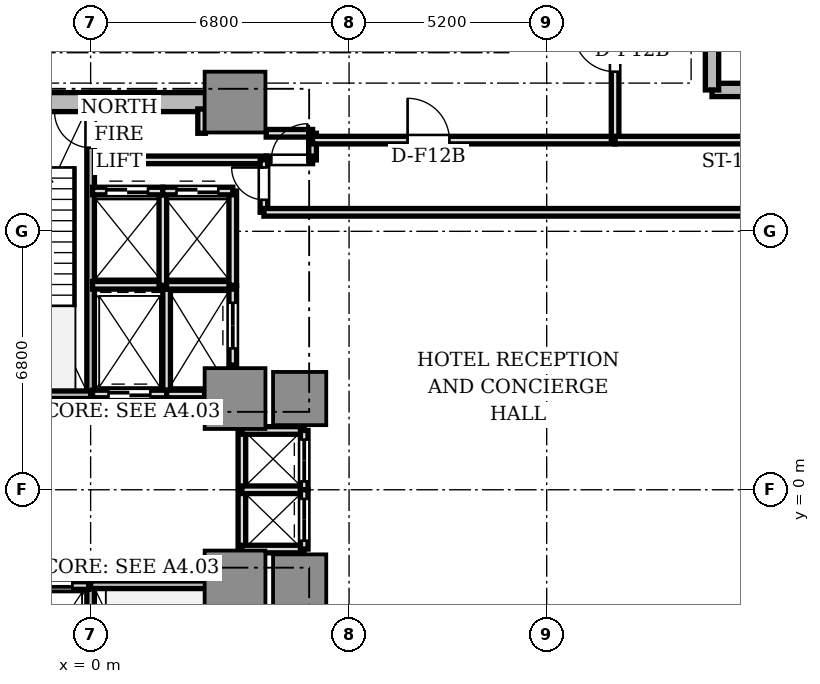
"""IFC4 building model, lengths in metres.
Left out: names, types, materials, properties, quantities, classifications, styles, units other than length and angle.
Written with IfcOpenShell. Run it as: python <this file> out.ifc"""

import sys

from ifc_helpers import new_model, si_unit, direction, frame, frame_2d, origin, origin_2d, place, context, subcontext, project, spatial, rectangle, extrude, source, transform, mapped, element, fill, save


model = new_model("IFC4")
c1 = context("Model", 3, precision=1e-05, world=origin(), true_north=direction((0.0, 1.0)))
c2 = subcontext(c1, "Body", "Model", "MODEL_VIEW")
j1 = project(units=[si_unit("LENGTHUNIT", "METRE"), si_unit("PLANEANGLEUNIT", "RADIAN")], contexts=[c1])
p1 = place(None, origin())
s1 = spatial("IfcSite", under=j1, at=p1, CompositionType="ELEMENT")
p2 = place(p1, origin())
s2 = spatial("IfcBuilding", under=s1, at=p2, CompositionType="ELEMENT")
p3 = place(p2, origin())
s3 = spatial("IfcBuildingStorey", under=s2, at=p3, CompositionType="ELEMENT", Elevation=0.0)
p4 = place(p3, frame((-3.55, 10.2, 0.0), z_axis=(0.0, 0.0, 1.0), x_axis=(1.0, 0.0, 0.0)))
e1 = element("IfcWall", 1, at=p4, inside=s3, PredefinedType="SHEAR", context=c2, shape_type="SweptSolid", body=[
    extrude(rectangle(XDim=7.1, YDim=0.5, at=frame_2d((3.55, 0.0))), origin(), (0.0, 0.0, 1.0), 4.48),
])
p5 = place(p3, frame((3.8, -9.75, 0.0), z_axis=(0.0, 0.0, 1.0), x_axis=(0.0, 1.0, 0.0)))
e2 = element("IfcWall", 2, at=p5, inside=s3, PredefinedType="SHEAR", context=c2, shape_type="SweptSolid", body=[
    extrude(rectangle(XDim=6.9, YDim=0.5, at=frame_2d((3.45, 0.0))), origin(), (0.0, 0.0, 1.0), 4.48),
])
m1 = source(origin(), c2, "Body", "SweptSolid", [
    extrude(rectangle(XDim=1.6, YDim=1.6, at=origin_2d()), origin(), (0.0, 0.0, 1.0), 4.48),
])
for number, where, z_axis, x_axis in (
    (3, (3.8, 2.4, 0.0), (0.0, 0.0, 1.0), (1.0, 0.0, 0.0)),
    (4, (3.8, 10.2, 0.0), (0.0, 0.0, 1.0), (1.0, 0.0, 0.0)),
    (5, (3.8, -2.4, 0.0), (0.0, 0.0, 1.0), (1.0, 0.0, 0.0)),
):
    element("IfcColumn", number, at=place(p3, frame(where, z_axis=z_axis, x_axis=x_axis)), inside=s3, PredefinedType="COLUMN", context=c2, shape_type="MappedRepresentation", body=[
        mapped(m1, transform((0.0, 0.0, 0.0), scale=1.0)),
    ])
m2 = source(origin(), c2, "Body", "SweptSolid", [
    extrude(rectangle(XDim=1.4, YDim=1.4, at=origin_2d()), origin(), (0.0, 0.0, 1.0), 4.48),
])
for number, where, z_axis, x_axis in (
    (6, (5.5, 2.4, 0.0), (0.0, 0.0, 1.0), (1.0, 0.0, 0.0)),
    (7, (5.5, -2.4, 0.0), (0.0, 0.0, 1.0), (1.0, 0.0, 0.0)),
):
    element("IfcColumn", number, at=place(p3, frame(where, z_axis=z_axis, x_axis=x_axis)), inside=s3, PredefinedType="COLUMN", context=c2, shape_type="MappedRepresentation", body=[
        mapped(m2, transform((0.0, 0.0, 0.0), scale=1.0)),
    ])
p6 = place(p3, frame((0.0, 2.5, 0.0), z_axis=(0.0, 0.0, 1.0), x_axis=(0.0, 1.0, 0.0)))
e8 = element("IfcWall", 8, at=p6, inside=s3, PredefinedType="SOLIDWALL", context=c2, shape_type="SweptSolid", body=[
    extrude(rectangle(XDim=7.68, YDim=0.2, at=frame_2d((3.84, 0.0))), origin(), (0.0, 0.0, 1.0), 4.48),
])
p7 = place(p6, frame((6.5, 0.0, 0.0)))
e9 = element("IfcOpeningElement", 9, at=p7, cuts=e8, PredefinedType="OPENING", context=c2, shape_type="SweptSolid", body=[
    extrude(rectangle(XDim=0.95, YDim=2.15, at=frame_2d((0.475, 1.075))), frame((0.0, 0.11, 0.0), z_axis=(0.0, -1.0, 0.0), x_axis=(1.0, 0.0, 0.0)), (0.0, 0.0, 1.0), 0.22),
])
p8 = place(p3, frame((-3.72, 2.5, 0.0), z_axis=(0.0, 0.0, 1.0), x_axis=(1.0, 0.0, 0.0)))
e10 = element("IfcWall", 10, at=p8, inside=s3, PredefinedType="SOLIDWALL", context=c2, shape_type="SweptSolid", body=[
    extrude(rectangle(XDim=3.72, YDim=0.2, at=frame_2d((1.86, 0.0))), origin(), (0.0, 0.0, 1.0), 4.48),
])
p9 = place(p3, frame((0.0, -10.18, 0.0), z_axis=(0.0, 0.0, 1.0), x_axis=(0.0, 1.0, 0.0)))
e11 = element("IfcWall", 11, at=p9, inside=s3, PredefinedType="SOLIDWALL", context=c2, shape_type="SweptSolid", body=[
    extrude(rectangle(XDim=7.68, YDim=0.2, at=frame_2d((3.84, 0.0))), origin(), (0.0, 0.0, 1.0), 4.48),
])
p10 = place(p9, frame((0.28, 0.0, 0.0)))
e12 = element("IfcOpeningElement", 12, at=p10, cuts=e11, PredefinedType="OPENING", context=c2, shape_type="SweptSolid", body=[
    extrude(rectangle(XDim=1.1, YDim=2.15, at=frame_2d((0.55, 1.075))), frame((0.0, 0.11, 0.0), z_axis=(0.0, -1.0, 0.0), x_axis=(1.0, 0.0, 0.0)), (0.0, 0.0, 1.0), 0.22),
])
p11 = place(p3, frame((0.0, -2.5, 0.0), z_axis=(0.0, 0.0, 1.0), x_axis=(1.0, 0.0, 0.0)))
e13 = element("IfcWall", 13, at=p11, inside=s3, PredefinedType="SOLIDWALL", context=c2, shape_type="SweptSolid", body=[
    extrude(rectangle(XDim=3.72, YDim=0.2, at=frame_2d((1.86, 0.0))), origin(), (0.0, 0.0, 1.0), 4.48),
])
p12 = place(p3, frame((2.0, 2.5, 0.0), z_axis=(0.0, 0.0, 1.0), x_axis=(0.0, 1.0, 0.0)))
e14 = element("IfcWall", 14, at=p12, inside=s3, PredefinedType="SOLIDWALL", context=c2, shape_type="SweptSolid", body=[
    extrude(rectangle(XDim=2.78, YDim=0.2, at=frame_2d((1.39, 0.0))), origin(), (0.0, 0.0, 1.0), 4.03),
])
p13 = place(p3, frame((0.05, 2.52, 0.0), z_axis=(0.0, 0.0, 1.0), x_axis=(1.0, 0.0, 0.0)))
e15 = element("IfcWall", 15, at=p13, inside=s3, PredefinedType="SOLIDWALL", context=c2, shape_type="SweptSolid", body=[
    extrude(rectangle(XDim=1.95, YDim=0.2, at=frame_2d((0.975, 0.0))), origin(), (0.0, 0.0, 1.0), 4.03),
])
p14 = place(p13, frame((0.42, 0.0, 0.0)))
e16 = element("IfcOpeningElement", 16, at=p14, cuts=e15, PredefinedType="OPENING", context=c2, shape_type="SweptSolid", body=[
    extrude(rectangle(XDim=1.1, YDim=2.2, at=frame_2d((0.55, 1.1))), frame((0.0, 0.11, 0.0), z_axis=(0.0, -1.0, 0.0), x_axis=(1.0, 0.0, 0.0)), (0.0, 0.0, 1.0), 0.22),
])
p15 = place(p3, frame((-2.0, -2.52, 0.0), z_axis=(0.0, 0.0, 1.0), x_axis=(1.0, 0.0, 0.0)))
e17 = element("IfcWall", 17, at=p15, inside=s3, PredefinedType="SOLIDWALL", context=c2, shape_type="SweptSolid", body=[
    extrude(rectangle(XDim=1.95, YDim=0.2, at=frame_2d((0.975, 0.0))), origin(), (0.0, 0.0, 1.0), 4.03),
])
p16 = place(p15, frame((0.42, 0.0, 0.0)))
e18 = element("IfcOpeningElement", 18, at=p16, cuts=e17, PredefinedType="OPENING", context=c2, shape_type="SweptSolid", body=[
    extrude(rectangle(XDim=1.1, YDim=2.2, at=frame_2d((0.55, 1.1))), frame((0.0, 0.11, 0.0), z_axis=(0.0, -1.0, 0.0), x_axis=(1.0, 0.0, 0.0)), (0.0, 0.0, 1.0), 0.22),
])
p17 = place(p3, frame((2.0, 2.52, 0.0), z_axis=(0.0, 0.0, 1.0), x_axis=(1.0, 0.0, 0.0)))
e19 = element("IfcWall", 19, at=p17, inside=s3, PredefinedType="SOLIDWALL", context=c2, shape_type="SweptSolid", body=[
    extrude(rectangle(XDim=1.0, YDim=0.2, at=frame_2d((0.5, 0.0))), origin(), (0.0, 0.0, 1.0), 4.03),
])
p18 = place(p3, frame((3.74, 3.28, 0.0), z_axis=(0.0, 0.0, 1.0), x_axis=(0.0, 1.0, 0.0)))
e20 = element("IfcWall", 20, at=p18, inside=s3, PredefinedType="SOLIDWALL", context=c2, shape_type="SweptSolid", body=[
    extrude(rectangle(XDim=2.08, YDim=0.2, at=frame_2d((1.04, 0.0))), origin(), (0.0, 0.0, 1.0), 4.03),
])
p19 = place(p18, frame((0.44, 0.0, 0.0)))
e21 = element("IfcOpeningElement", 21, at=p19, cuts=e20, PredefinedType="OPENING", context=c2, shape_type="SweptSolid", body=[
    extrude(rectangle(XDim=1.2, YDim=2.2, at=frame_2d((0.6, 1.1))), frame((0.0, 0.11, 0.0), z_axis=(0.0, -1.0, 0.0), x_axis=(1.0, 0.0, 0.0)), (0.0, 0.0, 1.0), 0.22),
])
p20 = place(p3, frame((0.05, 5.38, 0.0), z_axis=(0.0, 0.0, 1.0), x_axis=(1.0, 0.0, 0.0)))
e22 = element("IfcWall", 22, at=p20, inside=s3, PredefinedType="SOLIDWALL", context=c2, shape_type="SweptSolid", body=[
    extrude(rectangle(XDim=3.69, YDim=0.2, at=frame_2d((1.845, 0.0))), origin(), (0.0, 0.0, 1.0), 4.03),
])
p21 = place(p3, frame((1.9, 5.38, 0.0), z_axis=(0.0, 0.0, 1.0), x_axis=(0.0, 1.0, 0.0)))
e23 = element("IfcWall", 23, at=p21, inside=s3, PredefinedType="SOLIDWALL", context=c2, shape_type="SweptSolid", body=[
    extrude(rectangle(XDim=2.48, YDim=0.2, at=frame_2d((1.24, 0.0))), origin(), (0.0, 0.0, 1.0), 4.03),
])
p22 = place(p3, frame((0.05, 7.86, 0.0), z_axis=(0.0, 0.0, 1.0), x_axis=(1.0, 0.0, 0.0)))
e24 = element("IfcWall", 24, at=p22, inside=s3, PredefinedType="SOLIDWALL", context=c2, shape_type="SweptSolid", body=[
    extrude(rectangle(XDim=1.85, YDim=0.2, at=frame_2d((0.925, 0.0))), origin(), (0.0, 0.0, 1.0), 4.03),
])
p23 = place(p22, frame((0.36, 0.0, 0.0)))
e25 = element("IfcOpeningElement", 25, at=p23, cuts=e24, PredefinedType="OPENING", context=c2, shape_type="SweptSolid", body=[
    extrude(rectangle(XDim=1.1, YDim=2.2, at=frame_2d((0.55, 1.1))), frame((0.0, 0.11, 0.0), z_axis=(0.0, -1.0, 0.0), x_axis=(1.0, 0.0, 0.0)), (0.0, 0.0, 1.0), 0.22),
])
p24 = place(p3, frame((3.74, 5.38, 0.0), z_axis=(0.0, 0.0, 1.0), x_axis=(0.0, 1.0, 0.0)))
e26 = element("IfcWall", 26, at=p24, inside=s3, PredefinedType="SOLIDWALL", context=c2, shape_type="SweptSolid", body=[
    extrude(rectangle(XDim=2.48, YDim=0.2, at=frame_2d((1.24, 0.0))), origin(), (0.0, 0.0, 1.0), 4.03),
])
p25 = place(p3, frame((1.9, 7.86, 0.0), z_axis=(0.0, 0.0, 1.0), x_axis=(1.0, 0.0, 0.0)))
e27 = element("IfcWall", 27, at=p25, inside=s3, PredefinedType="SOLIDWALL", context=c2, shape_type="SweptSolid", body=[
    extrude(rectangle(XDim=1.84, YDim=0.2, at=frame_2d((0.92, 0.0))), origin(), (0.0, 0.0, 1.0), 4.03),
])
p26 = place(p25, frame((0.36, 0.0, 0.0)))
e28 = element("IfcOpeningElement", 28, at=p26, cuts=e27, PredefinedType="OPENING", context=c2, shape_type="SweptSolid", body=[
    extrude(rectangle(XDim=1.1, YDim=2.2, at=frame_2d((0.55, 1.1))), frame((0.0, 0.11, 0.0), z_axis=(0.0, -1.0, 0.0), x_axis=(1.0, 0.0, 0.0)), (0.0, 0.0, 1.0), 0.22),
])
p27 = place(p3, frame((3.98, -1.56, 0.0), z_axis=(0.0, 0.0, 1.0), x_axis=(0.0, 1.0, 0.0)))
e29 = element("IfcWall", 29, at=p27, inside=s3, PredefinedType="SOLIDWALL", context=c2, shape_type="SweptSolid", body=[
    extrude(rectangle(XDim=3.12, YDim=0.2, at=frame_2d((1.56, 0.0))), origin(), (0.0, 0.0, 1.0), 3.55),
])
for number, where, z_axis, x_axis in (
    (30, (3.98, 1.56, 0.0), (0.0, 0.0, 1.0), (1.0, 0.0, 0.0)),
    (31, (3.98, -1.56, 0.0), (0.0, 0.0, 1.0), (1.0, 0.0, 0.0)),
    (32, (3.98, 0.0, 0.0), (0.0, 0.0, 1.0), (1.0, 0.0, 0.0)),
):
    element("IfcWall", number, at=place(p3, frame(where, z_axis=z_axis, x_axis=x_axis)), inside=s3, PredefinedType="SOLIDWALL", context=c2, shape_type="SweptSolid", body=[
        extrude(rectangle(XDim=1.64, YDim=0.2, at=frame_2d((0.82, 0.0))), origin(), (0.0, 0.0, 1.0), 4.03),
    ])
p28 = place(p3, frame((5.62, 0.0, 0.0), z_axis=(0.0, 0.0, 1.0), x_axis=(0.0, 1.0, 0.0)))
e33 = element("IfcWall", 33, at=p28, inside=s3, PredefinedType="SOLIDWALL", context=c2, shape_type="SweptSolid", body=[
    extrude(rectangle(XDim=1.56, YDim=0.2, at=frame_2d((0.78, 0.0))), origin(), (0.0, 0.0, 1.0), 4.03),
])
p29 = place(p28, frame((0.22, 0.0, 0.0)))
e34 = element("IfcOpeningElement", 34, at=p29, cuts=e33, PredefinedType="OPENING", context=c2, shape_type="SweptSolid", body=[
    extrude(rectangle(XDim=1.1, YDim=2.2, at=frame_2d((0.55, 1.1))), frame((0.0, 0.11, 0.0), z_axis=(0.0, -1.0, 0.0), x_axis=(1.0, 0.0, 0.0)), (0.0, 0.0, 1.0), 0.22),
])
p30 = place(p3, frame((5.62, -1.56, 0.0), z_axis=(0.0, 0.0, 1.0), x_axis=(0.0, 1.0, 0.0)))
e35 = element("IfcWall", 35, at=p30, inside=s3, PredefinedType="SOLIDWALL", context=c2, shape_type="SweptSolid", body=[
    extrude(rectangle(XDim=1.56, YDim=0.2, at=frame_2d((0.78, 0.0))), origin(), (0.0, 0.0, 1.0), 4.03),
])
p31 = place(p30, frame((0.22, 0.0, 0.0)))
e36 = element("IfcOpeningElement", 36, at=p31, cuts=e35, PredefinedType="OPENING", context=c2, shape_type="SweptSolid", body=[
    extrude(rectangle(XDim=1.1, YDim=2.2, at=frame_2d((0.55, 1.1))), frame((0.0, 0.11, 0.0), z_axis=(0.0, -1.0, 0.0), x_axis=(1.0, 0.0, 0.0)), (0.0, 0.0, 1.0), 0.22),
])
p32 = place(p3, frame((16.35, 10.52, 0.0), z_axis=(0.0, 0.0, 1.0), x_axis=(1.0, 0.0, 0.0)))
e37 = element("IfcWall", 37, at=p32, inside=s3, PredefinedType="SHEAR", context=c2, shape_type="SweptSolid", body=[
    extrude(rectangle(XDim=10.25, YDim=0.35, at=frame_2d((5.125, 0.0))), origin(), (0.0, 0.0, 1.0), 4.48),
])
p33 = place(p3, frame((16.35, 10.52, 0.0), z_axis=(0.0, 0.0, 1.0), x_axis=(0.0, 1.0, 0.0)))
e38 = element("IfcWall", 38, at=p33, inside=s3, PredefinedType="SHEAR", context=c2, shape_type="SweptSolid", body=[
    extrude(rectangle(XDim=3.58, YDim=0.35, at=frame_2d((1.79, 0.0))), origin(), (0.0, 0.0, 1.0), 4.48),
])
p34 = place(p33, frame((1.15, 0.0, 0.0)))
e39 = element("IfcOpeningElement", 39, at=p34, cuts=e38, PredefinedType="OPENING", context=c2, shape_type="SweptSolid", body=[
    extrude(rectangle(XDim=1.2, YDim=2.2, at=frame_2d((0.6, 1.1))), frame((0.0, 0.185, 0.0), z_axis=(0.0, -1.0, 0.0), x_axis=(1.0, 0.0, 0.0)), (0.0, 0.0, 1.0), 0.37),
])
p35 = place(p3, frame((0.12, 8.68, 0.0), z_axis=(0.0, 0.0, 1.0), x_axis=(1.0, 0.0, 0.0)))
e40 = element("IfcWall", 40, at=p35, inside=s3, PredefinedType="SOLIDWALL", context=c2, shape_type="SweptSolid", body=[
    extrude(rectangle(XDim=4.5, YDim=0.2, at=frame_2d((2.25, 0.0))), origin(), (0.0, 0.0, 1.0), 4.03),
])
p36 = place(p3, frame((2.92, 9.38, 0.0), z_axis=(0.0, 0.0, 1.0), x_axis=(0.0, 1.0, 0.0)))
e41 = element("IfcWall", 41, at=p36, inside=s3, PredefinedType="SOLIDWALL", context=c2, shape_type="SweptSolid", body=[
    extrude(rectangle(XDim=0.64, YDim=0.2, at=frame_2d((0.32, 0.0))), origin(), (0.0, 0.0, 1.0), 4.03),
])
p37 = place(p3, frame((4.62, 9.38, 0.0), z_axis=(0.0, 0.0, 1.0), x_axis=(1.0, 0.0, 0.0)))
e42 = element("IfcWall", 42, at=p37, inside=s3, PredefinedType="SOLIDWALL", context=c2, shape_type="SweptSolid", body=[
    extrude(rectangle(XDim=1.22, YDim=0.2, at=frame_2d((0.61, 0.0))), origin(), (0.0, 0.0, 1.0), 4.03),
])
p38 = place(p3, frame((5.84, 8.68, 0.0), z_axis=(0.0, 0.0, 1.0), x_axis=(0.0, 1.0, 0.0)))
e43 = element("IfcWall", 43, at=p38, inside=s3, PredefinedType="SOLIDWALL", context=c2, shape_type="SweptSolid", body=[
    extrude(rectangle(XDim=0.7, YDim=0.2, at=frame_2d((0.35, 0.0))), origin(), (0.0, 0.0, 1.0), 4.03),
])
p39 = place(p3, frame((4.62, 8.68, 0.0), z_axis=(0.0, 0.0, 1.0), x_axis=(1.0, 0.0, 0.0)))
e44 = element("IfcWall", 44, at=p39, inside=s3, PredefinedType="SOLIDWALL", context=c2, shape_type="SweptSolid", body=[
    extrude(rectangle(XDim=1.22, YDim=0.2, at=frame_2d((0.61, 0.0))), origin(), (0.0, 0.0, 1.0), 4.03),
])
p40 = place(p39, frame((0.135, 0.0, 0.0)))
e45 = element("IfcOpeningElement", 45, at=p40, cuts=e44, PredefinedType="OPENING", context=c2, shape_type="SweptSolid", body=[
    extrude(rectangle(XDim=0.95, YDim=2.15, at=frame_2d((0.475, 1.075))), frame((0.0, 0.11, 0.0), z_axis=(0.0, -1.0, 0.0), x_axis=(1.0, 0.0, 0.0)), (0.0, 0.0, 1.0), 0.22),
])
p41 = place(p3, frame((4.56, 7.3, 0.0), z_axis=(0.0, 0.0, 1.0), x_axis=(0.0, 1.0, 0.0)))
e46 = element("IfcWall", 46, at=p41, inside=s3, PredefinedType="SOLIDWALL", context=c2, shape_type="SweptSolid", body=[
    extrude(rectangle(XDim=1.38, YDim=0.2, at=frame_2d((0.69, 0.0))), origin(), (0.0, 0.0, 1.0), 4.03),
])
p42 = place(p41, frame((0.33, 0.0, 0.0)))
e47 = element("IfcOpeningElement", 47, at=p42, cuts=e46, PredefinedType="OPENING", context=c2, shape_type="SweptSolid", body=[
    extrude(rectangle(XDim=0.85, YDim=2.1, at=frame_2d((0.425, 1.05))), frame((0.0, 0.11, 0.0), z_axis=(0.0, -1.0, 0.0), x_axis=(1.0, 0.0, 0.0)), (0.0, 0.0, 1.0), 0.22),
])
p43 = place(p3, frame((4.56, 7.3, 0.0), z_axis=(0.0, 0.0, 1.0), x_axis=(1.0, 0.0, 0.0)))
e48 = element("IfcWall", 48, at=p43, inside=s3, PredefinedType="SOLIDWALL", context=c2, shape_type="SweptSolid", body=[
    extrude(rectangle(XDim=31.12, YDim=0.2, at=frame_2d((15.56, 0.0))), origin(), (0.0, 0.0, 1.0), 3.95),
])
p44 = place(p3, frame((5.84, 9.2, 0.0), z_axis=(0.0, 0.0, 1.0), x_axis=(1.0, 0.0, 0.0)))
e49 = element("IfcWall", 49, at=p44, inside=s3, PredefinedType="SOLIDWALL", context=c2, shape_type="SweptSolid", body=[
    extrude(rectangle(XDim=7.96, YDim=0.2, at=frame_2d((3.98, 0.0))), origin(), (0.0, 0.0, 1.0), 4.03),
])
p45 = place(p44, frame((2.5, 0.0, 0.0)))
e50 = element("IfcOpeningElement", 50, at=p45, cuts=e49, PredefinedType="OPENING", context=c2, shape_type="SweptSolid", body=[
    extrude(rectangle(XDim=1.1, YDim=2.15, at=frame_2d((0.55, 1.075))), frame((0.0, 0.11, 0.0), z_axis=(0.0, -1.0, 0.0), x_axis=(1.0, 0.0, 0.0)), (0.0, 0.0, 1.0), 0.22),
])
p46 = place(p3, frame((13.8, 9.2, 0.0), z_axis=(0.0, 0.0, 1.0), x_axis=(0.0, 1.0, 0.0)))
e51 = element("IfcWall", 51, at=p46, inside=s3, PredefinedType="SOLIDWALL", context=c2, shape_type="SweptSolid", body=[
    extrude(rectangle(XDim=4.95, YDim=0.2, at=frame_2d((2.475, 0.0))), origin(), (0.0, 0.0, 1.0), 4.03),
])
p47 = place(p46, frame((1.8, 0.0, 0.0)))
e52 = element("IfcOpeningElement", 52, at=p47, cuts=e51, PredefinedType="OPENING", context=c2, shape_type="SweptSolid", body=[
    extrude(rectangle(XDim=1.1, YDim=2.15, at=frame_2d((0.55, 1.075))), frame((0.0, 0.11, 0.0), z_axis=(0.0, -1.0, 0.0), x_axis=(1.0, 0.0, 0.0)), (0.0, 0.0, 1.0), 0.22),
])
p48 = place(p3, frame((13.8, 9.2, 0.0), z_axis=(0.0, 0.0, 1.0), x_axis=(1.0, 0.0, 0.0)))
e53 = element("IfcWall", 53, at=p48, inside=s3, PredefinedType="SOLIDWALL", context=c2, shape_type="SweptSolid", body=[
    extrude(rectangle(XDim=21.88, YDim=0.2, at=frame_2d((10.94, 0.0))), origin(), (0.0, 0.0, 1.0), 3.95),
])
m3 = source(origin(), c2, "Body", "SweptSolid", [
    extrude(rectangle(XDim=1.1, YDim=0.05, at=origin_2d()), origin(), (0.0, 0.0, 1.0), 2.2),
])
p49 = place(p14, frame((0.55, 0.0, 0.0)))
e54 = element("IfcDoor", 54, at=p49, inside=s3, OperationType="DOUBLE_DOOR_SLIDING", PredefinedType="DOOR", context=c2, shape_type="MappedRepresentation", body=[
    mapped(m3, transform((0.0, 0.0, 0.0), scale=1.0)),
])
fill(e16, e54)
p50 = place(p16, frame((0.55, 0.0, 0.0)))
e55 = element("IfcDoor", 55, at=p50, inside=s3, OperationType="DOUBLE_DOOR_SLIDING", PredefinedType="DOOR", context=c2, shape_type="MappedRepresentation", body=[
    mapped(m3, transform((0.0, 0.0, 0.0), scale=1.0)),
])
fill(e18, e55)
m4 = source(origin(), c2, "Body", "SweptSolid", [
    extrude(rectangle(XDim=1.2, YDim=0.05, at=origin_2d()), origin(), (0.0, 0.0, 1.0), 2.2),
])
p51 = place(p19, frame((0.6, 0.0, 0.0)))
e56 = element("IfcDoor", 56, at=p51, inside=s3, OperationType="DOUBLE_DOOR_SLIDING", PredefinedType="DOOR", context=c2, shape_type="MappedRepresentation", body=[
    mapped(m4, transform((0.0, 0.0, 0.0), scale=1.0)),
])
fill(e21, e56)
p52 = place(p23, frame((0.55, 0.0, 0.0)))
e57 = element("IfcDoor", 57, at=p52, inside=s3, OperationType="DOUBLE_DOOR_SLIDING", PredefinedType="DOOR", context=c2, shape_type="MappedRepresentation", body=[
    mapped(m3, transform((0.0, 0.0, 0.0), scale=1.0)),
])
fill(e25, e57)
p53 = place(p26, frame((0.55, 0.0, 0.0)))
e58 = element("IfcDoor", 58, at=p53, inside=s3, OperationType="DOUBLE_DOOR_SLIDING", PredefinedType="DOOR", context=c2, shape_type="MappedRepresentation", body=[
    mapped(m3, transform((0.0, 0.0, 0.0), scale=1.0)),
])
fill(e28, e58)
p54 = place(p29, frame((0.55, 0.0, 0.0)))
e59 = element("IfcDoor", 59, at=p54, inside=s3, OperationType="DOUBLE_DOOR_SLIDING", PredefinedType="DOOR", context=c2, shape_type="MappedRepresentation", body=[
    mapped(m3, transform((0.0, 0.0, 0.0), scale=1.0)),
])
fill(e34, e59)
p55 = place(p31, frame((0.55, 0.0, 0.0)))
e60 = element("IfcDoor", 60, at=p55, inside=s3, OperationType="DOUBLE_DOOR_SLIDING", PredefinedType="DOOR", context=c2, shape_type="MappedRepresentation", body=[
    mapped(m3, transform((0.0, 0.0, 0.0), scale=1.0)),
])
fill(e36, e60)
m5 = source(origin(), c2, "Body", "SweptSolid", [
    extrude(rectangle(XDim=0.95, YDim=0.05, at=origin_2d()), origin(), (0.0, 0.0, 1.0), 2.15),
])
p56 = place(p7, frame((0.475, 0.0, 0.0)))
e61 = element("IfcDoor", 61, at=p56, inside=s3, OperationType="SINGLE_SWING_RIGHT", PredefinedType="DOOR", context=c2, shape_type="MappedRepresentation", body=[
    mapped(m5, transform((0.0, 0.0, 0.0), scale=1.0)),
])
fill(e9, e61)
p57 = place(p40, frame((0.475, 0.0, 0.0)))
e62 = element("IfcDoor", 62, at=p57, inside=s3, OperationType="SINGLE_SWING_RIGHT", PredefinedType="DOOR", context=c2, shape_type="MappedRepresentation", body=[
    mapped(m5, transform((0.0, 0.0, 0.0), scale=1.0)),
])
fill(e45, e62)
m6 = source(origin(), c2, "Body", "SweptSolid", [
    extrude(rectangle(XDim=0.85, YDim=0.05, at=origin_2d()), origin(), (0.0, 0.0, 1.0), 2.1),
])
p58 = place(p42, frame((0.425, 0.0, 0.0)))
e63 = element("IfcDoor", 63, at=p58, inside=s3, OperationType="SINGLE_SWING_RIGHT", PredefinedType="DOOR", context=c2, shape_type="MappedRepresentation", body=[
    mapped(m6, transform((0.0, 0.0, 0.0), scale=1.0)),
])
fill(e47, e63)
m7 = source(origin(), c2, "Body", "SweptSolid", [
    extrude(rectangle(XDim=1.1, YDim=0.05, at=origin_2d()), origin(), (0.0, 0.0, 1.0), 2.15),
])
p59 = place(p45, frame((0.55, 0.0, 0.0)))
e64 = element("IfcDoor", 64, at=p59, inside=s3, OperationType="SINGLE_SWING_LEFT", PredefinedType="DOOR", context=c2, shape_type="MappedRepresentation", body=[
    mapped(m7, transform((0.0, 0.0, 0.0), scale=1.0)),
])
fill(e50, e64)
p60 = place(p47, frame((0.55, 0.0, 0.0)))
e65 = element("IfcDoor", 65, at=p60, inside=s3, OperationType="SINGLE_SWING_RIGHT", PredefinedType="DOOR", context=c2, shape_type="MappedRepresentation", body=[
    mapped(m7, transform((0.0, 0.0, 0.0), scale=1.0)),
])
fill(e52, e65)
save(model, sys.argv[1])
